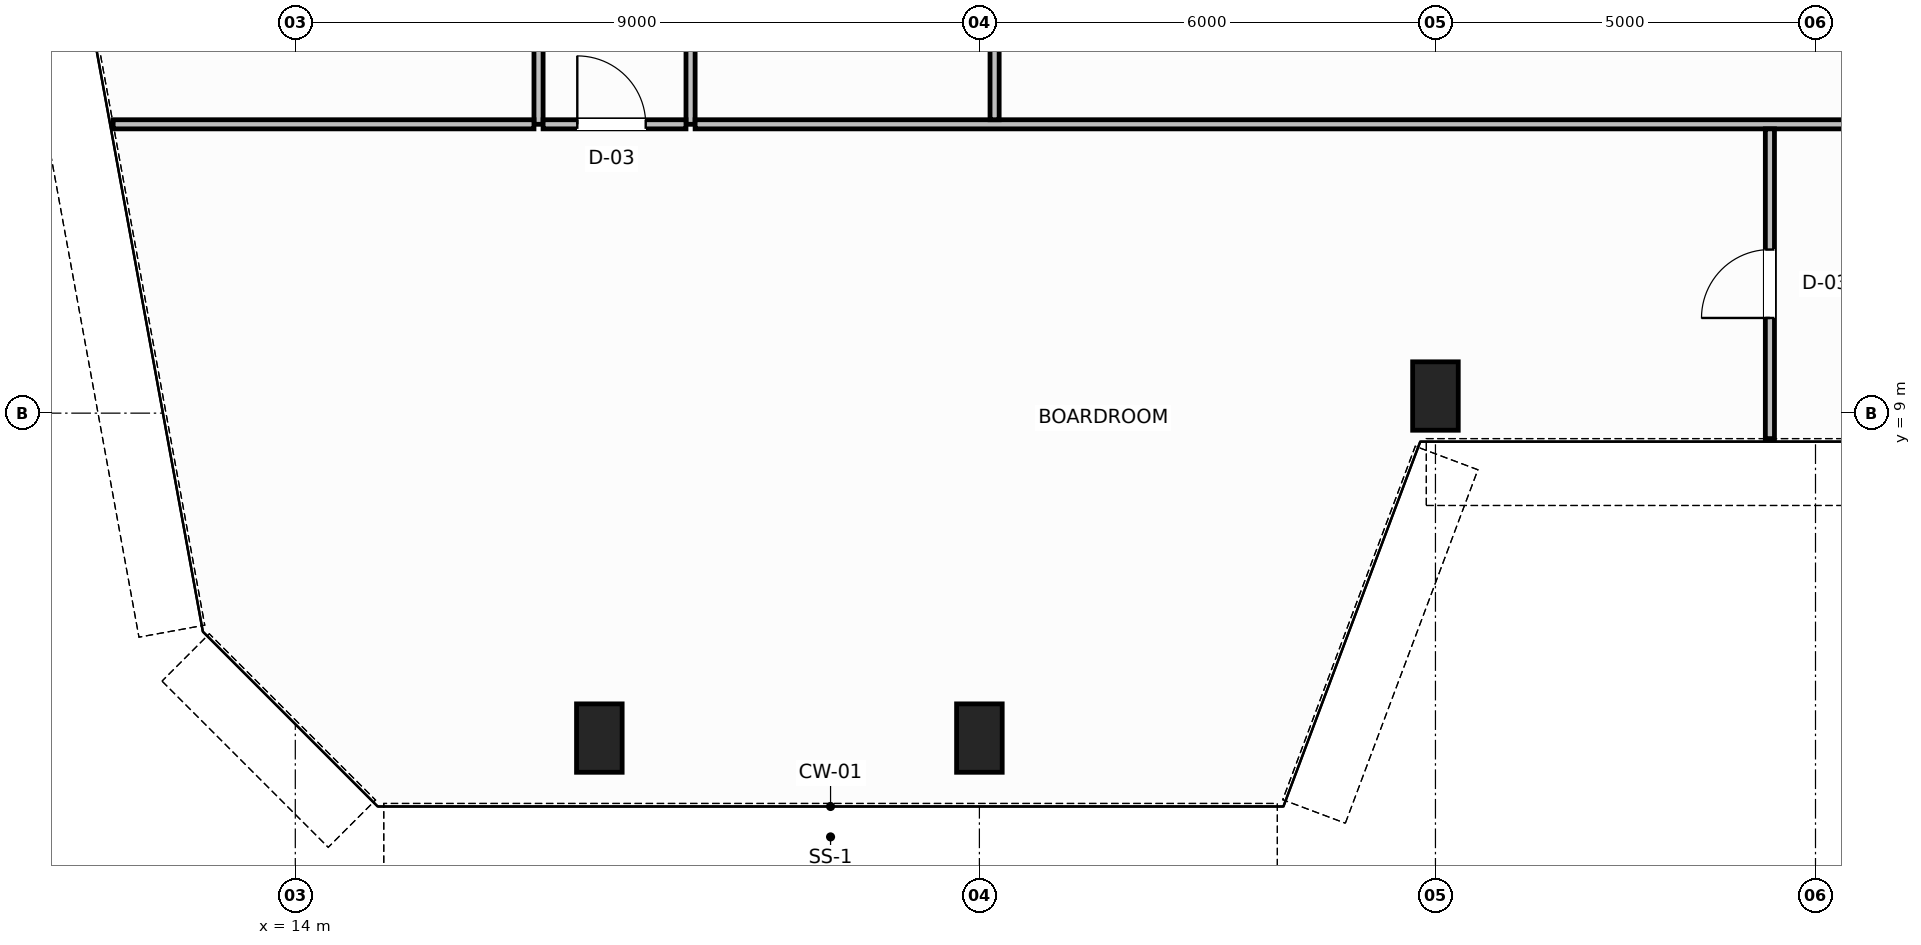
"""IFC4 building model, lengths in metres.
Left out: names, types, materials, properties, quantities, classifications, styles, units other than length and angle.
Written with IfcOpenShell. Run it as: python <this file> out.ifc"""

import sys

from ifc_helpers import new_model, si_unit, direction, frame, frame_2d, origin, origin_2d, place, context, subcontext, project, spatial, rectangle, hollow_rectangle, extrude, source, transform, mapped, element, fill, save


model = new_model("IFC4")
c1 = context("Model", 3, precision=1e-05, world=origin(), true_north=direction((0.0, 1.0)))
c2 = subcontext(c1, "Body", "Model", "MODEL_VIEW")
j1 = project(units=[si_unit("LENGTHUNIT", "METRE"), si_unit("PLANEANGLEUNIT", "RADIAN")], contexts=[c1])
p1 = place(None, origin())
s1 = spatial("IfcSite", under=j1, at=p1, CompositionType="ELEMENT")
p2 = place(p1, origin())
s2 = spatial("IfcBuilding", under=s1, at=p2, CompositionType="ELEMENT")
p3 = place(p2, frame((0.0, 0.0, 79.6)))
s3 = spatial("IfcBuildingStorey", under=s2, at=p3, CompositionType="ELEMENT", Elevation=79.6)
m1 = source(origin(), c2, "Body", "SweptSolid", [
    extrude(hollow_rectangle(XDim=0.6, YDim=0.9, WallThickness=0.04, InnerFilletRadius=0.04, OuterFilletRadius=0.08, at=origin_2d()), origin(), (0.0, 0.0, 1.0), 3.8),
])
for number, where, z_axis, x_axis in (
    (1, (18.0, 4.725, 0.0), (0.0, 0.0, 1.0), (1.0, 0.0, 0.0)),
    (2, (23.0, 4.725, 0.0), (0.0, 0.0, 1.0), (1.0, 0.0, 0.0)),
    (3, (29.0, 9.225, 0.0), (0.0, 0.0, 1.0), (1.0, 0.0, 0.0)),
):
    element("IfcColumn", number, at=place(p3, frame(where, z_axis=z_axis, x_axis=x_axis)), inside=s3, PredefinedType="COLUMN", context=c2, shape_type="MappedRepresentation", body=[
        mapped(m1, transform((0.0, 0.0, 0.0), scale=1.0)),
    ])
p4 = place(p3, frame((17.2, 12.8, 0.0), z_axis=(0.0, 0.0, 1.0), x_axis=(0.0, 1.0, 0.0)))
e4 = element("IfcWall", 4, at=p4, inside=s3, PredefinedType="PARTITIONING", context=c2, shape_type="SweptSolid", body=[
    extrude(rectangle(XDim=21.24, YDim=0.12, at=frame_2d((10.62, 0.0))), origin(), (0.0, 0.0, 1.0), 3.54),
])
p5 = place(p4, frame((2.85, 0.0, 0.0)))
e5 = element("IfcOpeningElement", 5, at=p5, cuts=e4, PredefinedType="OPENING", context=c2, shape_type="SweptSolid", body=[
    extrude(rectangle(XDim=0.9, YDim=2.15, at=frame_2d((0.45, 1.075))), frame((0.0, 0.07, 0.0), z_axis=(0.0, -1.0, 0.0), x_axis=(1.0, 0.0, 0.0)), (0.0, 0.0, 1.0), 0.14),
])
p6 = place(p4, frame((10.55, 0.0, 0.0)))
e6 = element("IfcOpeningElement", 6, at=p6, cuts=e4, PredefinedType="OPENING", context=c2, shape_type="SweptSolid", body=[
    extrude(rectangle(XDim=0.9, YDim=2.15, at=frame_2d((0.45, 1.075))), frame((0.0, 0.07, 0.0), z_axis=(0.0, -1.0, 0.0), x_axis=(1.0, 0.0, 0.0)), (0.0, 0.0, 1.0), 0.14),
])
p7 = place(p4, frame((17.87, 0.0, 0.0)))
e7 = element("IfcOpeningElement", 7, at=p7, cuts=e4, PredefinedType="OPENING", context=c2, shape_type="SweptSolid", body=[
    extrude(rectangle(XDim=0.9, YDim=2.15, at=frame_2d((0.45, 1.075))), frame((0.0, 0.07, 0.0), z_axis=(0.0, -1.0, 0.0), x_axis=(1.0, 0.0, 0.0)), (0.0, 0.0, 1.0), 0.14),
])
p8 = place(p3, frame((19.2, 12.8, 0.0), z_axis=(0.0, 0.0, 1.0), x_axis=(0.0, 1.0, 0.0)))
e8 = element("IfcWall", 8, at=p8, inside=s3, PredefinedType="PARTITIONING", context=c2, shape_type="SweptSolid", body=[
    extrude(rectangle(XDim=21.24, YDim=0.12, at=frame_2d((10.62, 0.0))), origin(), (0.0, 0.0, 1.0), 3.54),
])
p9 = place(p3, frame((17.26, 12.8, 0.0), z_axis=(0.0, 0.0, 1.0), x_axis=(1.0, 0.0, 0.0)))
e9 = element("IfcWall", 9, at=p9, inside=s3, PredefinedType="PARTITIONING", context=c2, shape_type="SweptSolid", body=[
    extrude(rectangle(XDim=1.88, YDim=0.12, at=frame_2d((0.94, 0.0))), origin(), (0.0, 0.0, 1.0), 3.54),
])
p10 = place(p9, frame((0.45, 0.0, 0.0)))
e10 = element("IfcOpeningElement", 10, at=p10, cuts=e9, PredefinedType="OPENING", context=c2, shape_type="SweptSolid", body=[
    extrude(rectangle(XDim=0.9, YDim=2.15, at=frame_2d((0.45, 1.075))), frame((0.0, 0.07, 0.0), z_axis=(0.0, -1.0, 0.0), x_axis=(1.0, 0.0, 0.0)), (0.0, 0.0, 1.0), 0.14),
])
p11 = place(p3, frame((11.604, 12.8, 0.0), z_axis=(0.0, 0.0, 1.0), x_axis=(1.0, 0.0, 0.0)))
e11 = element("IfcWall", 11, at=p11, inside=s3, PredefinedType="PARTITIONING", context=c2, shape_type="SweptSolid", body=[
    extrude(rectangle(XDim=5.536, YDim=0.12, at=frame_2d((2.768, 0.0))), origin(), (0.0, 0.0, 1.0), 3.54),
])
p12 = place(p3, frame((19.26, 12.8, 0.0), z_axis=(0.0, 0.0, 1.0), x_axis=(1.0, 0.0, 0.0)))
e12 = element("IfcWall", 12, at=p12, inside=s3, PredefinedType="PARTITIONING", context=c2, shape_type="SweptSolid", body=[
    extrude(rectangle(XDim=29.48, YDim=0.12, at=frame_2d((14.74, 0.0))), origin(), (0.0, 0.0, 1.0), 3.54),
])
p13 = place(p3, frame((23.2, 12.86, 0.0), z_axis=(0.0, 0.0, 1.0), x_axis=(0.0, 1.0, 0.0)))
e13 = element("IfcWall", 13, at=p13, inside=s3, PredefinedType="PARTITIONING", context=c2, shape_type="SweptSolid", body=[
    extrude(rectangle(XDim=21.18, YDim=0.12, at=frame_2d((10.59, 0.0))), origin(), (0.0, 0.0, 1.0), 2.73),
])
p14 = place(p3, frame((33.4, 8.665, 0.0), z_axis=(0.0, 0.0, 1.0), x_axis=(0.0, 1.0, 0.0)))
e14 = element("IfcWall", 14, at=p14, inside=s3, PredefinedType="PARTITIONING", context=c2, shape_type="SweptSolid", body=[
    extrude(rectangle(XDim=4.075, YDim=0.12, at=frame_2d((2.037, 0.0))), origin(), (0.0, 0.0, 1.0), 3.54),
])
p15 = place(p14, frame((1.587, 0.0, 0.0)))
e15 = element("IfcOpeningElement", 15, at=p15, cuts=e14, PredefinedType="OPENING", context=c2, shape_type="SweptSolid", body=[
    extrude(rectangle(XDim=0.9, YDim=2.15, at=frame_2d((0.45, 1.075))), frame((0.0, 0.07, 0.0), z_axis=(0.0, -1.0, 0.0), x_axis=(1.0, 0.0, 0.0)), (0.0, 0.0, 1.0), 0.14),
])
m2 = source(origin(), c2, "Body", "SweptSolid", [
    extrude(rectangle(XDim=0.9, YDim=2.15, at=frame_2d((0.45, 1.075))), frame((0.0, 0.025, 0.0), z_axis=(0.0, -1.0, 0.0), x_axis=(1.0, 0.0, 0.0)), (0.0, 0.0, 1.0), 0.05),
])
p16 = place(p10, origin())
e16 = element("IfcDoor", 16, at=p16, inside=s3, OperationType="SINGLE_SWING_LEFT", PredefinedType="DOOR", context=c2, shape_type="MappedRepresentation", body=[
    mapped(m2, transform((0.0, 0.0, 0.0), scale=1.0)),
])
fill(e10, e16)
p17 = place(p15, origin())
e17 = element("IfcDoor", 17, at=p17, inside=s3, OperationType="SINGLE_SWING_RIGHT", PredefinedType="DOOR", context=c2, shape_type="MappedRepresentation", body=[
    mapped(m2, transform((0.0, 0.0, 0.0), scale=1.0)),
])
fill(e15, e17)
save(model, sys.argv[1])
